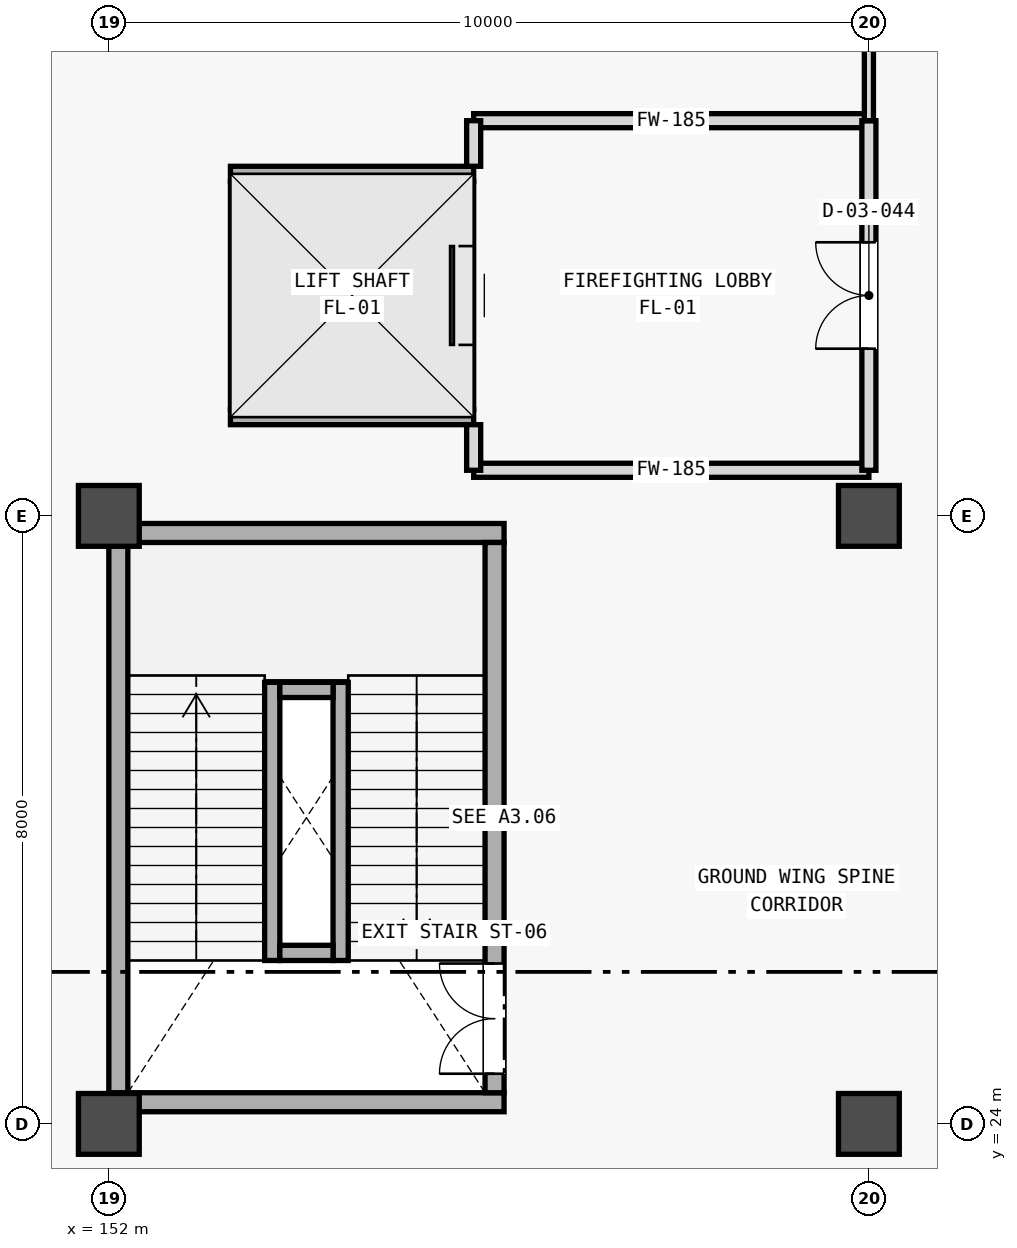
"""IFC4 building model, lengths in metres.
Left out: names, types, materials, properties, quantities, classifications, styles, units other than length and angle.
Written with IfcOpenShell. Run it as: python <this file> out.ifc"""

import sys

from ifc_helpers import new_model, si_unit, direction, frame, frame_2d, origin, origin_2d, place, context, subcontext, project, spatial, rectangle, extrude, element, fill, save


model = new_model("IFC4")
c1 = context("Model", 3, precision=1e-05, world=origin(), true_north=direction((0.0, 1.0)))
c2 = subcontext(c1, "Body", "Model", "MODEL_VIEW")
j1 = project(units=[si_unit("LENGTHUNIT", "METRE"), si_unit("PLANEANGLEUNIT", "RADIAN")], contexts=[c1])
p1 = place(None, origin())
s1 = spatial("IfcSite", under=j1, at=p1, CompositionType="ELEMENT")
p2 = place(p1, origin())
s2 = spatial("IfcBuilding", under=s1, at=p2, CompositionType="ELEMENT")
p3 = place(p2, origin())
s3 = spatial("IfcBuildingStorey", under=s2, at=p3, CompositionType="ELEMENT", Elevation=0.0)
for number, where, z_axis, x_axis in (
    (1, (152.0, 24.0, 0.0), (0.0, 0.0, 1.0), (1.0, 0.0, 0.0)),
    (2, (162.0, 24.0, 0.0), (0.0, 0.0, 1.0), (1.0, 0.0, 0.0)),
    (3, (152.0, 32.0, 0.0), (0.0, 0.0, 1.0), (1.0, 0.0, 0.0)),
    (4, (162.0, 32.0, 0.0), (0.0, 0.0, 1.0), (1.0, 0.0, 0.0)),
):
    element("IfcColumn", number, at=place(p3, frame(where, z_axis=z_axis, x_axis=x_axis)), inside=s3, PredefinedType="COLUMN", context=c2, shape_type="SweptSolid", body=[
        extrude(rectangle(XDim=0.8, YDim=0.8, at=origin_2d()), origin(), (0.0, 0.0, 1.0), 5.125),
    ])
for number, where, z_axis, x_axis in (
    (5, (152.0, 24.285, 0.0), (0.0, 0.0, 1.0), (1.0, 0.0, 0.0)),
    (6, (152.0, 31.775, 0.0), (0.0, 0.0, 1.0), (1.0, 0.0, 0.0)),
):
    element("IfcWall", number, at=place(p3, frame(where, z_axis=z_axis, x_axis=x_axis)), inside=s3, PredefinedType="SHEAR", context=c2, shape_type="SweptSolid", body=[
        extrude(rectangle(XDim=5.2, YDim=0.25, at=frame_2d((2.6, 0.0))), origin(), (0.0, 0.0, 1.0), 5.4),
    ])
p4 = place(p3, frame((152.125, 24.41, 0.0), z_axis=(0.0, 0.0, 1.0), x_axis=(0.0, 1.0, 0.0)))
e7 = element("IfcWall", 7, at=p4, inside=s3, PredefinedType="SHEAR", context=c2, shape_type="SweptSolid", body=[
    extrude(rectangle(XDim=7.24, YDim=0.25, at=frame_2d((3.62, 0.0))), origin(), (0.0, 0.0, 1.0), 5.4),
])
p5 = place(p3, frame((157.075, 24.41, 0.0), z_axis=(0.0, 0.0, 1.0), x_axis=(0.0, 1.0, 0.0)))
e8 = element("IfcWall", 8, at=p5, inside=s3, PredefinedType="SHEAR", context=c2, shape_type="SweptSolid", body=[
    extrude(rectangle(XDim=7.24, YDim=0.25, at=frame_2d((3.62, 0.0))), origin(), (0.0, 0.0, 1.0), 5.4),
])
p6 = place(p5, frame((0.25, 0.0, 0.0)))
e9 = element("IfcOpeningElement", 9, at=p6, cuts=e8, PredefinedType="OPENING", context=c2, shape_type="SweptSolid", body=[
    extrude(rectangle(XDim=1.45, YDim=2.2, at=frame_2d((0.725, 1.1))), frame((0.0, 0.135, 0.0), z_axis=(0.0, -1.0, 0.0), x_axis=(1.0, 0.0, 0.0)), (0.0, 0.0, 1.0), 0.27),
])
for number, where, z_axis, x_axis in (
    (10, (154.15, 26.15, 0.0), (0.0, 0.0, 1.0), (0.0, 1.0, 0.0)),
    (11, (155.05, 26.15, 0.0), (0.0, 0.0, 1.0), (0.0, 1.0, 0.0)),
):
    element("IfcWall", number, at=place(p3, frame(where, z_axis=z_axis, x_axis=x_axis)), inside=s3, PredefinedType="SHEAR", context=c2, shape_type="SweptSolid", body=[
        extrude(rectangle(XDim=3.66, YDim=0.2, at=frame_2d((1.83, 0.0))), origin(), (0.0, 0.0, 1.0), 5.4),
    ])
for number, where, z_axis, x_axis in (
    (12, (154.25, 26.25, 0.0), (0.0, 0.0, 1.0), (1.0, 0.0, 0.0)),
    (13, (154.25, 29.71, 0.0), (0.0, 0.0, 1.0), (1.0, 0.0, 0.0)),
):
    element("IfcWall", number, at=place(p3, frame(where, z_axis=z_axis, x_axis=x_axis)), inside=s3, PredefinedType="SHEAR", context=c2, shape_type="SweptSolid", body=[
        extrude(rectangle(XDim=0.7, YDim=0.2, at=frame_2d((0.35, 0.0))), origin(), (0.0, 0.0, 1.0), 5.4),
    ])
for number, where, z_axis, x_axis in (
    (14, (153.6, 33.3, 0.0), (0.0, 0.0, 1.0), (1.0, 0.0, 0.0)),
    (15, (153.6, 36.5, 0.0), (0.0, 0.0, 1.0), (1.0, 0.0, 0.0)),
):
    element("IfcWall", number, at=place(p3, frame(where, z_axis=z_axis, x_axis=x_axis)), inside=s3, PredefinedType="SHEAR", context=c2, shape_type="SweptSolid", body=[
        extrude(rectangle(XDim=3.2, YDim=0.2, at=frame_2d((1.6, 0.0))), origin(), (0.0, 0.0, 1.0), 5.4),
    ])
p7 = place(p3, frame((153.7, 33.4, 0.0), z_axis=(0.0, 0.0, 1.0), x_axis=(0.0, 1.0, 0.0)))
e16 = element("IfcWall", 16, at=p7, inside=s3, PredefinedType="SHEAR", context=c2, shape_type="SweptSolid", body=[
    extrude(rectangle(XDim=3.0, YDim=0.2, at=frame_2d((1.5, 0.0))), origin(), (0.0, 0.0, 1.0), 5.4),
])
p8 = place(p3, frame((156.7, 33.4, 0.0), z_axis=(0.0, 0.0, 1.0), x_axis=(0.0, 1.0, 0.0)))
e17 = element("IfcWall", 17, at=p8, inside=s3, PredefinedType="SHEAR", context=c2, shape_type="SweptSolid", body=[
    extrude(rectangle(XDim=3.0, YDim=0.2, at=frame_2d((1.5, 0.0))), origin(), (0.0, 0.0, 1.0), 5.4),
])
p9 = place(p8, frame((0.85, 0.0, 0.0)))
e18 = element("IfcOpeningElement", 18, at=p9, cuts=e17, PredefinedType="OPENING", context=c2, shape_type="SweptSolid", body=[
    extrude(rectangle(XDim=1.3, YDim=2.3, at=frame_2d((0.65, 1.15))), frame((0.0, 0.11, 0.0), z_axis=(0.0, -1.0, 0.0), x_axis=(1.0, 0.0, 0.0)), (0.0, 0.0, 1.0), 0.22),
])
for number, where, z_axis, x_axis in (
    (19, (162.0, 32.6, 0.0), (0.0, 0.0, 1.0), (-1.0, 0.0, 0.0)),
    (20, (156.8, 37.2, 0.0), (0.0, 0.0, 1.0), (1.0, 0.0, 0.0)),
):
    element("IfcWall", number, at=place(p3, frame(where, z_axis=z_axis, x_axis=x_axis)), inside=s3, PredefinedType="STANDARD", context=c2, shape_type="SweptSolid", body=[
        extrude(rectangle(XDim=5.2, YDim=0.185, at=frame_2d((2.6, 0.0))), origin(), (0.0, 0.0, 1.0), 4.405),
    ])
p10 = place(p3, frame((162.0, 32.6, 0.0), z_axis=(0.0, 0.0, 1.0), x_axis=(0.0, 1.0, 0.0)))
e21 = element("IfcWall", 21, at=p10, inside=s3, PredefinedType="STANDARD", context=c2, shape_type="SweptSolid", body=[
    extrude(rectangle(XDim=4.6, YDim=0.185, at=frame_2d((2.3, 0.0))), origin(), (0.0, 0.0, 1.0), 4.405),
])
p11 = place(p10, frame((1.6, 0.0, 0.0)))
e22 = element("IfcOpeningElement", 22, at=p11, cuts=e21, PredefinedType="OPENING", context=c2, shape_type="SweptSolid", body=[
    extrude(rectangle(XDim=1.4, YDim=2.2, at=frame_2d((0.7, 1.1))), frame((0.0, 0.103, 0.0), z_axis=(0.0, -1.0, 0.0), x_axis=(1.0, 0.0, 0.0)), (0.0, 0.0, 1.0), 0.205),
])
for number, where, z_axis, x_axis in (
    (23, (156.8, 32.6, 0.0), (0.0, 0.0, 1.0), (0.0, 1.0, 0.0)),
    (24, (156.8, 36.6, 0.0), (0.0, 0.0, 1.0), (0.0, 1.0, 0.0)),
):
    element("IfcWall", number, at=place(p3, frame(where, z_axis=z_axis, x_axis=x_axis)), inside=s3, PredefinedType="STANDARD", context=c2, shape_type="SweptSolid", body=[
        extrude(rectangle(XDim=0.6, YDim=0.185, at=frame_2d((0.3, 0.0))), origin(), (0.0, 0.0, 1.0), 4.405),
    ])
p12 = place(p3, frame((162.0, 37.2, 0.0), z_axis=(0.0, 0.0, 1.0), x_axis=(0.0, 1.0, 0.0)))
e25 = element("IfcWall", 25, at=p12, inside=s3, PredefinedType="PARTITIONING", context=c2, shape_type="SweptSolid", body=[
    extrude(rectangle(XDim=2.398, YDim=0.12, at=frame_2d((1.199, 0.0))), origin(), (0.0, 0.0, 1.0), 4.405),
])
p13 = place(p6, origin())
e26 = element("IfcDoor", 26, at=p13, inside=s3, OperationType="DOUBLE_DOOR_SINGLE_SWING", PredefinedType="DOOR", context=c2, shape_type="SweptSolid", body=[
    extrude(rectangle(XDim=1.45, YDim=2.2, at=frame_2d((0.725, 1.1))), frame((0.0, 0.025, 0.0), z_axis=(0.0, -1.0, 0.0), x_axis=(1.0, 0.0, 0.0)), (0.0, 0.0, 1.0), 0.05),
])
fill(e9, e26)
p14 = place(p9, origin())
e27 = element("IfcDoor", 27, at=p14, inside=s3, OperationType="SLIDING_TO_RIGHT", PredefinedType="DOOR", context=c2, shape_type="SweptSolid", body=[
    extrude(rectangle(XDim=1.3, YDim=2.3, at=frame_2d((0.65, 1.15))), frame((0.0, 0.025, 0.0), z_axis=(0.0, -1.0, 0.0), x_axis=(1.0, 0.0, 0.0)), (0.0, 0.0, 1.0), 0.05),
])
fill(e18, e27)
p15 = place(p11, origin())
e28 = element("IfcDoor", 28, at=p15, inside=s3, OperationType="DOUBLE_DOOR_SINGLE_SWING", PredefinedType="DOOR", context=c2, shape_type="SweptSolid", body=[
    extrude(rectangle(XDim=1.4, YDim=2.2, at=frame_2d((0.7, 1.1))), frame((0.0, 0.025, 0.0), z_axis=(0.0, -1.0, 0.0), x_axis=(1.0, 0.0, 0.0)), (0.0, 0.0, 1.0), 0.05),
])
fill(e22, e28)
save(model, sys.argv[1])
